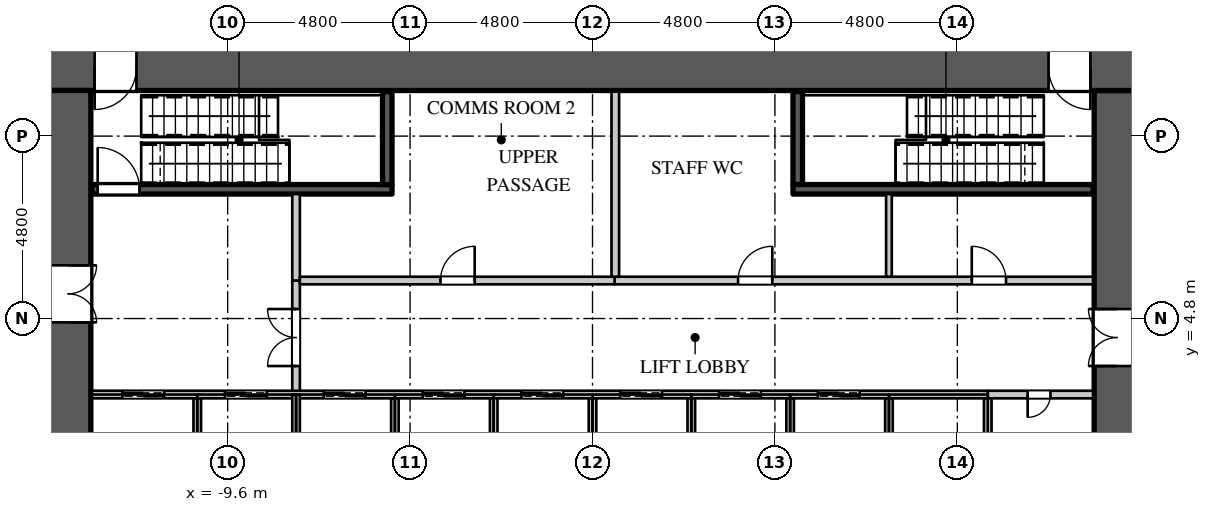
"""IFC4 building model, lengths in metres.
Left out: names, types, materials, properties, quantities, classifications, styles, units other than length and angle.
Written with IfcOpenShell. Run it as: python <this file> out.ifc"""

import sys

from ifc_helpers import new_model, si_unit, direction, frame, frame_2d, origin, place, context, subcontext, project, spatial, rectangle, extrude, element, fill, save


model = new_model("IFC4")
c1 = context("Model", 3, precision=1e-05, world=origin(), true_north=direction((0.0, 1.0)))
c2 = subcontext(c1, "Body", "Model", "MODEL_VIEW")
j1 = project(units=[si_unit("LENGTHUNIT", "METRE"), si_unit("PLANEANGLEUNIT", "RADIAN")], contexts=[c1])
p1 = place(None, origin())
s1 = spatial("IfcSite", under=j1, at=p1, CompositionType="ELEMENT")
p2 = place(p1, origin())
s2 = spatial("IfcBuilding", under=s1, at=p2, CompositionType="ELEMENT")
p3 = place(p2, frame((0.0, 0.0, 21.0)))
s3 = spatial("IfcBuildingStorey", under=s2, at=p3, CompositionType="ELEMENT", Elevation=21.0)
p4 = place(p3, frame((-14.4, 11.4, 0.0), z_axis=(0.0, 0.0, 1.0), x_axis=(1.0, 0.0, 0.0)))
e1 = element("IfcWall", 1, at=p4, inside=s3, PredefinedType="SHEAR", context=c2, shape_type="SweptSolid", body=[
    extrude(rectangle(XDim=28.8, YDim=1.2, at=frame_2d((14.4, 0.0))), origin(), (0.0, 0.0, 1.0), 4.5),
])
p5 = place(p4, frame((1.3, 0.0, 0.0)))
e2 = element("IfcOpeningElement", 2, at=p5, cuts=e1, PredefinedType="OPENING", context=c2, shape_type="SweptSolid", body=[
    extrude(rectangle(XDim=1.1, YDim=2.2, at=frame_2d((0.55, 1.1))), frame((0.0, 0.61, 0.0), z_axis=(0.0, -1.0, 0.0), x_axis=(1.0, 0.0, 0.0)), (0.0, 0.0, 1.0), 1.22),
])
p6 = place(p4, frame((26.4, 0.0, 0.0)))
e3 = element("IfcOpeningElement", 3, at=p6, cuts=e1, PredefinedType="OPENING", context=c2, shape_type="SweptSolid", body=[
    extrude(rectangle(XDim=1.1, YDim=2.2, at=frame_2d((0.55, 1.1))), frame((0.0, 0.61, 0.0), z_axis=(0.0, -1.0, 0.0), x_axis=(1.0, 0.0, 0.0)), (0.0, 0.0, 1.0), 1.22),
])
p7 = place(p3, frame((13.8, -10.8, 0.0), z_axis=(0.0, 0.0, 1.0), x_axis=(0.0, 1.0, 0.0)))
e4 = element("IfcWall", 4, at=p7, inside=s3, PredefinedType="SHEAR", context=c2, shape_type="SweptSolid", body=[
    extrude(rectangle(XDim=21.6, YDim=1.2, at=frame_2d((10.8, 0.0))), origin(), (0.0, 0.0, 1.0), 4.5),
])
p8 = place(p7, frame((14.35, 0.0, 0.0)))
e5 = element("IfcOpeningElement", 5, at=p8, cuts=e4, PredefinedType="OPENING", context=c2, shape_type="SweptSolid", body=[
    extrude(rectangle(XDim=1.5, YDim=2.4, at=frame_2d((0.75, 1.2))), frame((0.0, 0.61, 0.0), z_axis=(0.0, -1.0, 0.0), x_axis=(1.0, 0.0, 0.0)), (0.0, 0.0, 1.0), 1.22),
])
p9 = place(p7, frame((5.75, 0.0, 0.0)))
e6 = element("IfcOpeningElement", 6, at=p9, cuts=e4, PredefinedType="OPENING", context=c2, shape_type="SweptSolid", body=[
    extrude(rectangle(XDim=1.5, YDim=2.4, at=frame_2d((0.75, 1.2))), frame((0.0, 0.61, 0.0), z_axis=(0.0, -1.0, 0.0), x_axis=(1.0, 0.0, 0.0)), (0.0, 0.0, 1.0), 1.22),
])
p10 = place(p3, frame((-13.8, -10.8, 0.0), z_axis=(0.0, 0.0, 1.0), x_axis=(0.0, 1.0, 0.0)))
e7 = element("IfcWall", 7, at=p10, inside=s3, PredefinedType="SHEAR", context=c2, shape_type="SweptSolid", body=[
    extrude(rectangle(XDim=21.6, YDim=1.2, at=frame_2d((10.8, 0.0))), origin(), (0.0, 0.0, 1.0), 4.5),
])
p11 = place(p10, frame((15.5, 0.0, 0.0)))
e8 = element("IfcOpeningElement", 8, at=p11, cuts=e7, PredefinedType="OPENING", context=c2, shape_type="SweptSolid", body=[
    extrude(rectangle(XDim=1.5, YDim=2.4, at=frame_2d((0.75, 1.2))), frame((0.0, 0.61, 0.0), z_axis=(0.0, -1.0, 0.0), x_axis=(1.0, 0.0, 0.0)), (0.0, 0.0, 1.0), 1.22),
])
p12 = place(p10, frame((4.5, 0.0, 0.0)))
e9 = element("IfcOpeningElement", 9, at=p12, cuts=e7, PredefinedType="OPENING", context=c2, shape_type="SweptSolid", body=[
    extrude(rectangle(XDim=1.5, YDim=2.4, at=frame_2d((0.75, 1.2))), frame((0.0, 0.61, 0.0), z_axis=(0.0, -1.0, 0.0), x_axis=(1.0, 0.0, 0.0)), (0.0, 0.0, 1.0), 1.22),
])
p13 = place(p3, frame((-7.8, 2.8, 0.0), z_axis=(0.0, 0.0, 1.0), x_axis=(0.0, 1.0, 0.0)))
e10 = element("IfcWall", 10, at=p13, inside=s3, PredefinedType="PARTITIONING", context=c2, shape_type="SweptSolid", body=[
    extrude(rectangle(XDim=3.0, YDim=0.2, at=frame_2d((1.5, 0.0))), origin(), (0.0, 0.0, 1.0), 4.25),
])
p14 = place(p13, frame((0.75, 0.0, 0.0)))
e11 = element("IfcOpeningElement", 11, at=p14, cuts=e10, PredefinedType="OPENING", context=c2, shape_type="SweptSolid", body=[
    extrude(rectangle(XDim=1.5, YDim=2.4, at=frame_2d((0.75, 1.2))), frame((0.0, 0.11, 0.0), z_axis=(0.0, -1.0, 0.0), x_axis=(1.0, 0.0, 0.0)), (0.0, 0.0, 1.0), 0.22),
])
p15 = place(p3, frame((0.58, 5.8, 0.0), z_axis=(0.0, 0.0, 1.0), x_axis=(1.0, 0.0, 0.0)))
e12 = element("IfcWall", 12, at=p15, inside=s3, PredefinedType="PARTITIONING", context=c2, shape_type="SweptSolid", body=[
    extrude(rectangle(XDim=12.59, YDim=0.2, at=frame_2d((6.295, 0.0))), origin(), (0.0, 0.0, 1.0), 4.25),
])
p16 = place(p15, frame((3.25, 0.0, 0.0)))
e13 = element("IfcOpeningElement", 13, at=p16, cuts=e12, PredefinedType="OPENING", context=c2, shape_type="SweptSolid", body=[
    extrude(rectangle(XDim=0.9, YDim=2.2, at=frame_2d((0.45, 1.1))), frame((0.0, 0.11, 0.0), z_axis=(0.0, -1.0, 0.0), x_axis=(1.0, 0.0, 0.0)), (0.0, 0.0, 1.0), 0.22),
])
p17 = place(p15, frame((9.4, 0.0, 0.0)))
e14 = element("IfcOpeningElement", 14, at=p17, cuts=e12, PredefinedType="OPENING", context=c2, shape_type="SweptSolid", body=[
    extrude(rectangle(XDim=0.9, YDim=2.2, at=frame_2d((0.45, 1.1))), frame((0.0, 0.11, 0.0), z_axis=(0.0, -1.0, 0.0), x_axis=(1.0, 0.0, 0.0)), (0.0, 0.0, 1.0), 0.22),
])
p18 = place(p3, frame((7.8, 5.9, 0.0), z_axis=(0.0, 0.0, 1.0), x_axis=(0.0, 1.0, 0.0)))
e15 = element("IfcWall", 15, at=p18, inside=s3, PredefinedType="PARTITIONING", context=c2, shape_type="SweptSolid", body=[
    extrude(rectangle(XDim=2.175, YDim=0.15, at=frame_2d((1.087, 0.0))), origin(), (0.0, 0.0, 1.0), 4.25),
])
p19 = place(p3, frame((-7.8, 5.8, 0.0), z_axis=(0.0, 0.0, 1.0), x_axis=(0.0, 1.0, 0.0)))
e16 = element("IfcWall", 16, at=p19, inside=s3, PredefinedType="PARTITIONING", context=c2, shape_type="SweptSolid", body=[
    extrude(rectangle(XDim=2.275, YDim=0.2, at=frame_2d((1.137, 0.0))), origin(), (0.0, 0.0, 1.0), 4.25),
])
p20 = place(p3, frame((-7.7, 5.8, 0.0), z_axis=(0.0, 0.0, 1.0), x_axis=(1.0, 0.0, 0.0)))
e17 = element("IfcWall", 17, at=p20, inside=s3, PredefinedType="PARTITIONING", context=c2, shape_type="SweptSolid", body=[
    extrude(rectangle(XDim=8.28, YDim=0.2, at=frame_2d((4.14, 0.0))), origin(), (0.0, 0.0, 1.0), 4.25),
])
p21 = place(p20, frame((3.7, 0.0, 0.0)))
e18 = element("IfcOpeningElement", 18, at=p21, cuts=e17, PredefinedType="OPENING", context=c2, shape_type="SweptSolid", body=[
    extrude(rectangle(XDim=0.9, YDim=2.2, at=frame_2d((0.45, 1.1))), frame((0.0, 0.11, 0.0), z_axis=(0.0, -1.0, 0.0), x_axis=(1.0, 0.0, 0.0)), (0.0, 0.0, 1.0), 0.22),
])
p22 = place(p3, frame((0.6, 5.9, 0.0), z_axis=(0.0, 0.0, 1.0), x_axis=(0.0, 1.0, 0.0)))
e19 = element("IfcWall", 19, at=p22, inside=s3, PredefinedType="PARTITIONING", context=c2, shape_type="SweptSolid", body=[
    extrude(rectangle(XDim=4.87, YDim=0.2, at=frame_2d((2.435, 0.0))), origin(), (0.0, 0.0, 1.0), 4.25),
])
p23 = place(p3, frame((10.4, 2.8, 0.0), z_axis=(0.0, 0.0, 1.0), x_axis=(1.0, 0.0, 0.0)))
e20 = element("IfcWall", 20, at=p23, inside=s3, PredefinedType="PARTITIONING", context=c2, shape_type="SweptSolid", body=[
    extrude(rectangle(XDim=2.77, YDim=0.2, at=frame_2d((1.385, 0.0))), origin(), (0.0, 0.0, 1.0), 4.25),
])
p24 = place(p23, frame((1.05, 0.0, 0.0)))
e21 = element("IfcOpeningElement", 21, at=p24, cuts=e20, PredefinedType="OPENING", context=c2, shape_type="SweptSolid", body=[
    extrude(rectangle(XDim=0.6, YDim=2.0, at=frame_2d((0.3, 1.0))), frame((0.0, 0.11, 0.0), z_axis=(0.0, -1.0, 0.0), x_axis=(1.0, 0.0, 0.0)), (0.0, 0.0, 1.0), 0.22),
])
p25 = place(p3, frame((-13.17, 2.8, 0.0), z_axis=(0.0, 0.0, 1.0), x_axis=(1.0, 0.0, 0.0)))
e22 = element("IfcWall", 22, at=p25, inside=s3, PredefinedType="PARTITIONING", context=c2, shape_type="SweptSolid", body=[
    extrude(rectangle(XDim=23.57, YDim=0.2, at=frame_2d((11.785, 0.0))), origin(), (0.0, 0.0, 1.0), 4.25),
])
p26 = place(p25, frame((0.8, 0.0, 0.0)))
e23 = element("IfcOpeningElement", 23, at=p26, cuts=e22, PredefinedType="OPENING", context=c2, shape_type="SweptSolid", body=[
    extrude(rectangle(XDim=1.1, YDim=2.2, at=frame_2d((0.55, 1.1))), frame((0.0, 0.11, 0.0), z_axis=(0.0, -1.0, 0.0), x_axis=(1.0, 0.0, 0.0)), (0.0, 0.0, 1.0), 0.22),
])
p27 = place(p25, frame((3.5, 0.0, 0.0)))
e24 = element("IfcOpeningElement", 24, at=p27, cuts=e22, PredefinedType="OPENING", context=c2, shape_type="SweptSolid", body=[
    extrude(rectangle(XDim=1.1, YDim=2.2, at=frame_2d((0.55, 1.1))), frame((0.0, 0.11, 0.0), z_axis=(0.0, -1.0, 0.0), x_axis=(1.0, 0.0, 0.0)), (0.0, 0.0, 1.0), 0.22),
])
p28 = place(p25, frame((6.1, 0.0, 0.0)))
e25 = element("IfcOpeningElement", 25, at=p28, cuts=e22, PredefinedType="OPENING", context=c2, shape_type="SweptSolid", body=[
    extrude(rectangle(XDim=1.1, YDim=2.2, at=frame_2d((0.55, 1.1))), frame((0.0, 0.11, 0.0), z_axis=(0.0, -1.0, 0.0), x_axis=(1.0, 0.0, 0.0)), (0.0, 0.0, 1.0), 0.22),
])
p29 = place(p25, frame((8.7, 0.0, 0.0)))
e26 = element("IfcOpeningElement", 26, at=p29, cuts=e22, PredefinedType="OPENING", context=c2, shape_type="SweptSolid", body=[
    extrude(rectangle(XDim=1.1, YDim=2.2, at=frame_2d((0.55, 1.1))), frame((0.0, 0.11, 0.0), z_axis=(0.0, -1.0, 0.0), x_axis=(1.0, 0.0, 0.0)), (0.0, 0.0, 1.0), 0.22),
])
p30 = place(p25, frame((11.3, 0.0, 0.0)))
e27 = element("IfcOpeningElement", 27, at=p30, cuts=e22, PredefinedType="OPENING", context=c2, shape_type="SweptSolid", body=[
    extrude(rectangle(XDim=1.1, YDim=2.2, at=frame_2d((0.55, 1.1))), frame((0.0, 0.11, 0.0), z_axis=(0.0, -1.0, 0.0), x_axis=(1.0, 0.0, 0.0)), (0.0, 0.0, 1.0), 0.22),
])
p31 = place(p25, frame((13.9, 0.0, 0.0)))
e28 = element("IfcOpeningElement", 28, at=p31, cuts=e22, PredefinedType="OPENING", context=c2, shape_type="SweptSolid", body=[
    extrude(rectangle(XDim=1.1, YDim=2.2, at=frame_2d((0.55, 1.1))), frame((0.0, 0.11, 0.0), z_axis=(0.0, -1.0, 0.0), x_axis=(1.0, 0.0, 0.0)), (0.0, 0.0, 1.0), 0.22),
])
p32 = place(p25, frame((16.5, 0.0, 0.0)))
e29 = element("IfcOpeningElement", 29, at=p32, cuts=e22, PredefinedType="OPENING", context=c2, shape_type="SweptSolid", body=[
    extrude(rectangle(XDim=1.1, YDim=2.2, at=frame_2d((0.55, 1.1))), frame((0.0, 0.11, 0.0), z_axis=(0.0, -1.0, 0.0), x_axis=(1.0, 0.0, 0.0)), (0.0, 0.0, 1.0), 0.22),
])
p33 = place(p25, frame((19.1, 0.0, 0.0)))
e30 = element("IfcOpeningElement", 30, at=p33, cuts=e22, PredefinedType="OPENING", context=c2, shape_type="SweptSolid", body=[
    extrude(rectangle(XDim=1.1, YDim=2.2, at=frame_2d((0.55, 1.1))), frame((0.0, 0.11, 0.0), z_axis=(0.0, -1.0, 0.0), x_axis=(1.0, 0.0, 0.0)), (0.0, 0.0, 1.0), 0.22),
])
p34 = place(p3, frame((-10.4, 0.0, 0.0), z_axis=(0.0, 0.0, 1.0), x_axis=(0.0, 1.0, 0.0)))
e31 = element("IfcWall", 31, at=p34, inside=s3, PredefinedType="PARTITIONING", context=c2, shape_type="SweptSolid", body=[
    extrude(rectangle(XDim=2.7, YDim=0.2, at=frame_2d((1.35, 0.0))), origin(), (0.0, 0.0, 1.0), 4.25),
])
p35 = place(p3, frame((-7.8, 0.0, 0.0), z_axis=(0.0, 0.0, 1.0), x_axis=(0.0, 1.0, 0.0)))
e32 = element("IfcWall", 32, at=p35, inside=s3, PredefinedType="PARTITIONING", context=c2, shape_type="SweptSolid", body=[
    extrude(rectangle(XDim=2.8, YDim=0.2, at=frame_2d((1.4, 0.0))), origin(), (0.0, 0.0, 1.0), 4.25),
])
p36 = place(p3, frame((-5.2, 0.1, 0.0), z_axis=(0.0, 0.0, 1.0), x_axis=(0.0, 1.0, 0.0)))
e33 = element("IfcWall", 33, at=p36, inside=s3, PredefinedType="PARTITIONING", context=c2, shape_type="SweptSolid", body=[
    extrude(rectangle(XDim=2.6, YDim=0.2, at=frame_2d((1.3, 0.0))), origin(), (0.0, 0.0, 1.0), 4.25),
])
p37 = place(p3, frame((-2.6, 0.0, 0.0), z_axis=(0.0, 0.0, 1.0), x_axis=(0.0, 1.0, 0.0)))
e34 = element("IfcWall", 34, at=p37, inside=s3, PredefinedType="PARTITIONING", context=c2, shape_type="SweptSolid", body=[
    extrude(rectangle(XDim=2.7, YDim=0.2, at=frame_2d((1.35, 0.0))), origin(), (0.0, 0.0, 1.0), 4.25),
])
for number, where, z_axis, x_axis in (
    (35, (0.0, 0.1, 0.0), (0.0, 0.0, 1.0), (0.0, 1.0, 0.0)),
    (36, (2.6, 0.1, 0.0), (0.0, 0.0, 1.0), (0.0, 1.0, 0.0)),
    (37, (5.2, 0.1, 0.0), (0.0, 0.0, 1.0), (0.0, 1.0, 0.0)),
):
    element("IfcWall", number, at=place(p3, frame(where, z_axis=z_axis, x_axis=x_axis)), inside=s3, PredefinedType="PARTITIONING", context=c2, shape_type="SweptSolid", body=[
        extrude(rectangle(XDim=2.6, YDim=0.2, at=frame_2d((1.3, 0.0))), origin(), (0.0, 0.0, 1.0), 4.25),
    ])
p38 = place(p3, frame((7.8, 0.0, 0.0), z_axis=(0.0, 0.0, 1.0), x_axis=(0.0, 1.0, 0.0)))
e38 = element("IfcWall", 38, at=p38, inside=s3, PredefinedType="PARTITIONING", context=c2, shape_type="SweptSolid", body=[
    extrude(rectangle(XDim=2.7, YDim=0.2, at=frame_2d((1.35, 0.0))), origin(), (0.0, 0.0, 1.0), 4.25),
])
p39 = place(p3, frame((10.4, -2.7, 0.0), z_axis=(0.0, 0.0, 1.0), x_axis=(0.0, 1.0, 0.0)))
e39 = element("IfcWall", 39, at=p39, inside=s3, PredefinedType="PARTITIONING", context=c2, shape_type="SweptSolid", body=[
    extrude(rectangle(XDim=5.4, YDim=0.2, at=frame_2d((2.7, 0.0))), origin(), (0.0, 0.0, 1.0), 4.25),
])
p40 = place(p3, frame((-13.17, 8.2, 0.0), z_axis=(0.0, 0.0, 1.0), x_axis=(1.0, 0.0, 0.0)))
e40 = element("IfcWall", 40, at=p40, inside=s3, PredefinedType="SHEAR", context=c2, shape_type="SweptSolid", body=[
    extrude(rectangle(XDim=7.895, YDim=0.25, at=frame_2d((3.948, 0.0))), origin(), (0.0, 0.0, 1.0), 4.25),
])
p41 = place(p40, frame((0.15, 0.0, 0.0)))
e41 = element("IfcOpeningElement", 41, at=p41, cuts=e40, PredefinedType="OPENING", context=c2, shape_type="SweptSolid", body=[
    extrude(rectangle(XDim=1.1, YDim=2.2, at=frame_2d((0.55, 1.1))), frame((0.0, 0.135, 0.0), z_axis=(0.0, -1.0, 0.0), x_axis=(1.0, 0.0, 0.0)), (0.0, 0.0, 1.0), 0.27),
])
for number, where, z_axis, x_axis in (
    (42, (-5.4, 8.325, 0.0), (0.0, 0.0, 1.0), (0.0, 1.0, 0.0)),
    (43, (5.4, 8.325, 0.0), (0.0, 0.0, 1.0), (0.0, 1.0, 0.0)),
):
    element("IfcWall", number, at=place(p3, frame(where, z_axis=z_axis, x_axis=x_axis)), inside=s3, PredefinedType="SHEAR", context=c2, shape_type="SweptSolid", body=[
        extrude(rectangle(XDim=2.445, YDim=0.25, at=frame_2d((1.223, 0.0))), origin(), (0.0, 0.0, 1.0), 4.25),
    ])
p42 = place(p3, frame((5.275, 8.2, 0.0), z_axis=(0.0, 0.0, 1.0), x_axis=(1.0, 0.0, 0.0)))
e44 = element("IfcWall", 44, at=p42, inside=s3, PredefinedType="SHEAR", context=c2, shape_type="SweptSolid", body=[
    extrude(rectangle(XDim=7.895, YDim=0.25, at=frame_2d((3.948, 0.0))), origin(), (0.0, 0.0, 1.0), 4.25),
])
p43 = place(p24, origin())
e45 = element("IfcDoor", 45, at=p43, inside=s3, OperationType="SINGLE_SWING_RIGHT", PredefinedType="DOOR", context=c2, shape_type="SweptSolid", body=[
    extrude(rectangle(XDim=0.6, YDim=2.0, at=frame_2d((0.3, 1.0))), frame((0.0, 0.025, 0.0), z_axis=(0.0, -1.0, 0.0), x_axis=(1.0, 0.0, 0.0)), (0.0, 0.0, 1.0), 0.05),
])
fill(e21, e45)
p44 = place(p21, origin())
e46 = element("IfcDoor", 46, at=p44, inside=s3, OperationType="SINGLE_SWING_RIGHT", PredefinedType="DOOR", context=c2, shape_type="SweptSolid", body=[
    extrude(rectangle(XDim=0.9, YDim=2.2, at=frame_2d((0.45, 1.1))), frame((0.0, 0.025, 0.0), z_axis=(0.0, -1.0, 0.0), x_axis=(1.0, 0.0, 0.0)), (0.0, 0.0, 1.0), 0.05),
])
fill(e18, e46)
p45 = place(p16, origin())
e47 = element("IfcDoor", 47, at=p45, inside=s3, OperationType="SINGLE_SWING_RIGHT", PredefinedType="DOOR", context=c2, shape_type="SweptSolid", body=[
    extrude(rectangle(XDim=0.9, YDim=2.2, at=frame_2d((0.45, 1.1))), frame((0.0, 0.025, 0.0), z_axis=(0.0, -1.0, 0.0), x_axis=(1.0, 0.0, 0.0)), (0.0, 0.0, 1.0), 0.05),
])
fill(e13, e47)
p46 = place(p17, origin())
e48 = element("IfcDoor", 48, at=p46, inside=s3, OperationType="SINGLE_SWING_LEFT", PredefinedType="DOOR", context=c2, shape_type="SweptSolid", body=[
    extrude(rectangle(XDim=0.9, YDim=2.2, at=frame_2d((0.45, 1.1))), frame((0.0, 0.025, 0.0), z_axis=(0.0, -1.0, 0.0), x_axis=(1.0, 0.0, 0.0)), (0.0, 0.0, 1.0), 0.05),
])
fill(e14, e48)
p47 = place(p26, origin())
e49 = element("IfcDoor", 49, at=p47, inside=s3, OperationType="DOUBLE_DOOR_SLIDING", PredefinedType="DOOR", context=c2, shape_type="SweptSolid", body=[
    extrude(rectangle(XDim=1.1, YDim=2.2, at=frame_2d((0.55, 1.1))), frame((0.0, 0.025, 0.0), z_axis=(0.0, -1.0, 0.0), x_axis=(1.0, 0.0, 0.0)), (0.0, 0.0, 1.0), 0.05),
])
fill(e23, e49)
p48 = place(p27, origin())
e50 = element("IfcDoor", 50, at=p48, inside=s3, OperationType="DOUBLE_DOOR_SLIDING", PredefinedType="DOOR", context=c2, shape_type="SweptSolid", body=[
    extrude(rectangle(XDim=1.1, YDim=2.2, at=frame_2d((0.55, 1.1))), frame((0.0, 0.025, 0.0), z_axis=(0.0, -1.0, 0.0), x_axis=(1.0, 0.0, 0.0)), (0.0, 0.0, 1.0), 0.05),
])
fill(e24, e50)
p49 = place(p28, origin())
e51 = element("IfcDoor", 51, at=p49, inside=s3, OperationType="DOUBLE_DOOR_SLIDING", PredefinedType="DOOR", context=c2, shape_type="SweptSolid", body=[
    extrude(rectangle(XDim=1.1, YDim=2.2, at=frame_2d((0.55, 1.1))), frame((0.0, 0.025, 0.0), z_axis=(0.0, -1.0, 0.0), x_axis=(1.0, 0.0, 0.0)), (0.0, 0.0, 1.0), 0.05),
])
fill(e25, e51)
p50 = place(p29, origin())
e52 = element("IfcDoor", 52, at=p50, inside=s3, OperationType="DOUBLE_DOOR_SLIDING", PredefinedType="DOOR", context=c2, shape_type="SweptSolid", body=[
    extrude(rectangle(XDim=1.1, YDim=2.2, at=frame_2d((0.55, 1.1))), frame((0.0, 0.025, 0.0), z_axis=(0.0, -1.0, 0.0), x_axis=(1.0, 0.0, 0.0)), (0.0, 0.0, 1.0), 0.05),
])
fill(e26, e52)
p51 = place(p30, origin())
e53 = element("IfcDoor", 53, at=p51, inside=s3, OperationType="DOUBLE_DOOR_SLIDING", PredefinedType="DOOR", context=c2, shape_type="SweptSolid", body=[
    extrude(rectangle(XDim=1.1, YDim=2.2, at=frame_2d((0.55, 1.1))), frame((0.0, 0.025, 0.0), z_axis=(0.0, -1.0, 0.0), x_axis=(1.0, 0.0, 0.0)), (0.0, 0.0, 1.0), 0.05),
])
fill(e27, e53)
p52 = place(p31, origin())
e54 = element("IfcDoor", 54, at=p52, inside=s3, OperationType="DOUBLE_DOOR_SLIDING", PredefinedType="DOOR", context=c2, shape_type="SweptSolid", body=[
    extrude(rectangle(XDim=1.1, YDim=2.2, at=frame_2d((0.55, 1.1))), frame((0.0, 0.025, 0.0), z_axis=(0.0, -1.0, 0.0), x_axis=(1.0, 0.0, 0.0)), (0.0, 0.0, 1.0), 0.05),
])
fill(e28, e54)
p53 = place(p32, origin())
e55 = element("IfcDoor", 55, at=p53, inside=s3, OperationType="DOUBLE_DOOR_SLIDING", PredefinedType="DOOR", context=c2, shape_type="SweptSolid", body=[
    extrude(rectangle(XDim=1.1, YDim=2.2, at=frame_2d((0.55, 1.1))), frame((0.0, 0.025, 0.0), z_axis=(0.0, -1.0, 0.0), x_axis=(1.0, 0.0, 0.0)), (0.0, 0.0, 1.0), 0.05),
])
fill(e29, e55)
p54 = place(p33, origin())
e56 = element("IfcDoor", 56, at=p54, inside=s3, OperationType="DOUBLE_DOOR_SLIDING", PredefinedType="DOOR", context=c2, shape_type="SweptSolid", body=[
    extrude(rectangle(XDim=1.1, YDim=2.2, at=frame_2d((0.55, 1.1))), frame((0.0, 0.025, 0.0), z_axis=(0.0, -1.0, 0.0), x_axis=(1.0, 0.0, 0.0)), (0.0, 0.0, 1.0), 0.05),
])
fill(e30, e56)
p55 = place(p41, origin())
e57 = element("IfcDoor", 57, at=p55, inside=s3, OperationType="SINGLE_SWING_LEFT", PredefinedType="DOOR", context=c2, shape_type="SweptSolid", body=[
    extrude(rectangle(XDim=1.1, YDim=2.2, at=frame_2d((0.55, 1.1))), frame((0.0, 0.025, 0.0), z_axis=(0.0, -1.0, 0.0), x_axis=(1.0, 0.0, 0.0)), (0.0, 0.0, 1.0), 0.05),
])
fill(e41, e57)
p56 = place(p14, origin())
e58 = element("IfcDoor", 58, at=p56, inside=s3, OperationType="DOUBLE_DOOR_SINGLE_SWING", PredefinedType="DOOR", context=c2, shape_type="SweptSolid", body=[
    extrude(rectangle(XDim=1.5, YDim=2.4, at=frame_2d((0.75, 1.2))), frame((0.0, 0.025, 0.0), z_axis=(0.0, -1.0, 0.0), x_axis=(1.0, 0.0, 0.0)), (0.0, 0.0, 1.0), 0.05),
])
fill(e11, e58)
p57 = place(p8, origin())
e59 = element("IfcDoor", 59, at=p57, inside=s3, OperationType="DOUBLE_DOOR_SINGLE_SWING", PredefinedType="DOOR", context=c2, shape_type="SweptSolid", body=[
    extrude(rectangle(XDim=1.5, YDim=2.4, at=frame_2d((0.75, 1.2))), frame((0.0, 0.025, 0.0), z_axis=(0.0, -1.0, 0.0), x_axis=(1.0, 0.0, 0.0)), (0.0, 0.0, 1.0), 0.05),
])
fill(e5, e59)
p58 = place(p11, origin())
e60 = element("IfcDoor", 60, at=p58, inside=s3, OperationType="DOUBLE_DOOR_SINGLE_SWING", PredefinedType="DOOR", context=c2, shape_type="SweptSolid", body=[
    extrude(rectangle(XDim=1.5, YDim=2.4, at=frame_2d((0.75, 1.2))), frame((0.0, 0.025, 0.0), z_axis=(0.0, -1.0, 0.0), x_axis=(1.0, 0.0, 0.0)), (0.0, 0.0, 1.0), 0.05),
])
fill(e8, e60)
p59 = place(p5, origin())
e61 = element("IfcDoor", 61, at=p59, inside=s3, OperationType="SINGLE_SWING_RIGHT", PredefinedType="DOOR", context=c2, shape_type="SweptSolid", body=[
    extrude(rectangle(XDim=1.1, YDim=2.2, at=frame_2d((0.55, 1.1))), frame((0.0, 0.025, 0.0), z_axis=(0.0, -1.0, 0.0), x_axis=(1.0, 0.0, 0.0)), (0.0, 0.0, 1.0), 0.05),
])
fill(e2, e61)
p60 = place(p6, origin())
e62 = element("IfcDoor", 62, at=p60, inside=s3, OperationType="SINGLE_SWING_LEFT", PredefinedType="DOOR", context=c2, shape_type="SweptSolid", body=[
    extrude(rectangle(XDim=1.1, YDim=2.2, at=frame_2d((0.55, 1.1))), frame((0.0, 0.025, 0.0), z_axis=(0.0, -1.0, 0.0), x_axis=(1.0, 0.0, 0.0)), (0.0, 0.0, 1.0), 0.05),
])
fill(e3, e62)
save(model, sys.argv[1])
